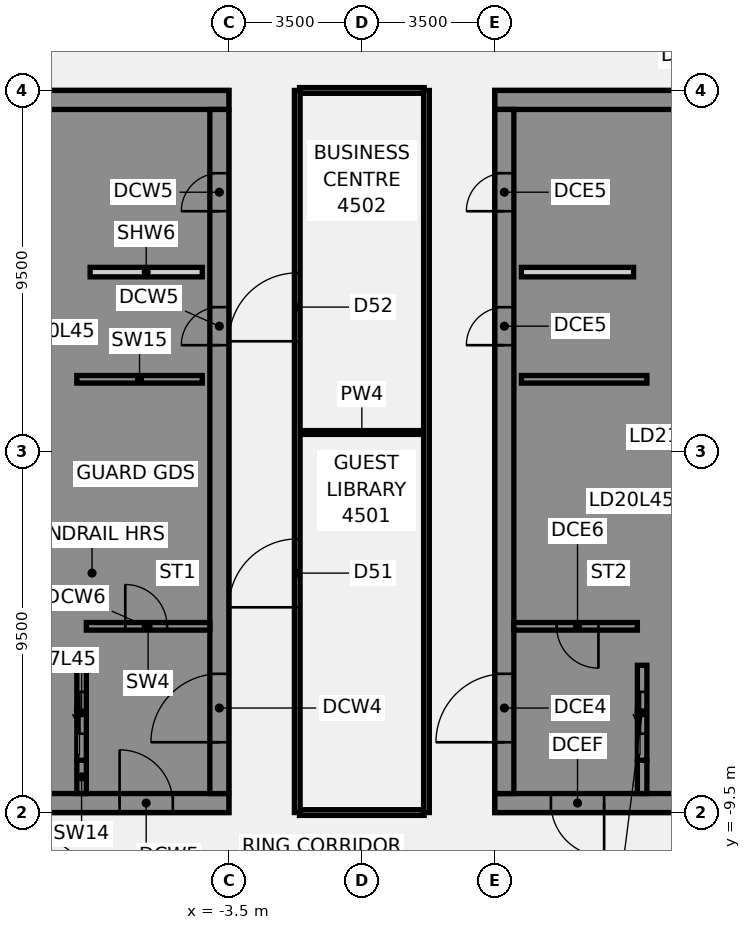
"""IFC4 building model, lengths in metres.
Left out: names, types, materials, properties, quantities, classifications, styles, units other than length and angle.
Written with IfcOpenShell. Run it as: python <this file> out.ifc"""

import sys

from ifc_helpers import new_model, si_unit, direction, frame, frame_2d, origin, place, context, subcontext, project, spatial, polyline, rectangle, outline, extrude, element, fill, save


model = new_model("IFC4")
c1 = context("Model", 3, precision=1e-05, world=origin(), true_north=direction((0.0, 1.0)))
c2 = subcontext(c1, "Body", "Model", "MODEL_VIEW")
j1 = project(units=[si_unit("LENGTHUNIT", "METRE"), si_unit("PLANEANGLEUNIT", "RADIAN")], contexts=[c1])
p1 = place(None, origin())
s1 = spatial("IfcSite", under=j1, at=p1, CompositionType="ELEMENT")
p2 = place(p1, origin())
s2 = spatial("IfcBuilding", under=s1, at=p2, CompositionType="ELEMENT")
p3 = place(p2, frame((0.0, 0.0, 182.5)))
s3 = spatial("IfcBuildingStorey", under=s2, at=p3, CompositionType="ELEMENT", Elevation=182.5)
p4 = place(p3, frame((-1.64, -9.5, 0.0), z_axis=(0.0, 0.0, 1.0), x_axis=(1.0, 0.0, 0.0)))
e1 = element("IfcWall", 1, at=p4, inside=s3, PredefinedType="PARTITIONING", context=c2, shape_type="SweptSolid", body=[
    extrude(rectangle(XDim=3.28, YDim=0.15, at=frame_2d((1.64, 0.0))), origin(), (0.0, 0.0, 1.0), 2.864),
])
p5 = place(p3, frame((-1.64, 0.5, 0.0), z_axis=(0.0, 0.0, 1.0), x_axis=(1.0, 0.0, 0.0)))
e2 = element("IfcWall", 2, at=p5, inside=s3, PredefinedType="PARTITIONING", context=c2, shape_type="SweptSolid", body=[
    extrude(rectangle(XDim=3.28, YDim=0.1, at=frame_2d((1.64, 0.0))), origin(), (0.0, 0.0, 1.0), 2.864),
])
p6 = place(p3, frame((-1.64, 9.5, 0.0), z_axis=(0.0, 0.0, 1.0), x_axis=(1.0, 0.0, 0.0)))
e3 = element("IfcWall", 3, at=p6, inside=s3, PredefinedType="PARTITIONING", context=c2, shape_type="SweptSolid", body=[
    extrude(rectangle(XDim=3.28, YDim=0.15, at=frame_2d((1.64, 0.0))), origin(), (0.0, 0.0, 1.0), 2.864),
])
p7 = place(p3, frame((-1.7, -9.5, 0.0), z_axis=(0.0, 0.0, 1.0), x_axis=(0.0, 1.0, 0.0)))
e4 = element("IfcWall", 4, at=p7, inside=s3, PredefinedType="PARTITIONING", context=c2, shape_type="SweptSolid", body=[
    extrude(rectangle(XDim=19.0, YDim=0.15, at=frame_2d((9.5, 0.0))), origin(), (0.0, 0.0, 1.0), 2.864),
])
p8 = place(p7, frame((5.4, 0.0, 0.0)))
e5 = element("IfcOpeningElement", 5, at=p8, cuts=e4, PredefinedType="OPENING", context=c2, shape_type="SweptSolid", body=[
    extrude(rectangle(XDim=1.8, YDim=2.1, at=frame_2d((0.9, 1.05))), frame((0.0, 0.085, 0.0), z_axis=(0.0, -1.0, 0.0), x_axis=(1.0, 0.0, 0.0)), (0.0, 0.0, 1.0), 0.17),
])
p9 = place(p7, frame((12.4, 0.0, 0.0)))
e6 = element("IfcOpeningElement", 6, at=p9, cuts=e4, PredefinedType="OPENING", context=c2, shape_type="SweptSolid", body=[
    extrude(rectangle(XDim=1.8, YDim=2.1, at=frame_2d((0.9, 1.05))), frame((0.0, 0.085, 0.0), z_axis=(0.0, -1.0, 0.0), x_axis=(1.0, 0.0, 0.0)), (0.0, 0.0, 1.0), 0.17),
])
p10 = place(p3, frame((1.7, -9.5, 0.0), z_axis=(0.0, 0.0, 1.0), x_axis=(0.0, 1.0, 0.0)))
e7 = element("IfcWall", 7, at=p10, inside=s3, PredefinedType="PARTITIONING", context=c2, shape_type="SweptSolid", body=[
    extrude(rectangle(XDim=19.0, YDim=0.15, at=frame_2d((9.5, 0.0))), origin(), (0.0, 0.0, 1.0), 2.864),
])
p11 = place(p3, frame((-16.5, -9.25, 0.0), z_axis=(0.0, 0.0, 1.0), x_axis=(1.0, 0.0, 0.0)))
e8 = element("IfcWall", 8, at=p11, inside=s3, PredefinedType="SHEAR", context=c2, shape_type="SweptSolid", body=[
    extrude(rectangle(XDim=13.0, YDim=0.5, at=frame_2d((6.5, 0.0))), origin(), (0.0, 0.0, 1.0), 3.46),
])
p12 = place(p11, frame((4.15, 0.0, 0.0)))
e9 = element("IfcOpeningElement", 9, at=p12, cuts=e8, PredefinedType="OPENING", context=c2, shape_type="SweptSolid", body=[
    extrude(rectangle(XDim=1.4, YDim=2.1, at=frame_2d((0.7, 1.05))), frame((0.0, 0.26, 0.0), z_axis=(0.0, -1.0, 0.0), x_axis=(1.0, 0.0, 0.0)), (0.0, 0.0, 1.0), 0.52),
])
p13 = place(p11, frame((10.125, 0.0, 0.0)))
e10 = element("IfcOpeningElement", 10, at=p13, cuts=e8, PredefinedType="OPENING", context=c2, shape_type="SweptSolid", body=[
    extrude(rectangle(XDim=1.4, YDim=2.1, at=frame_2d((0.7, 1.05))), frame((0.0, 0.26, 0.0), z_axis=(0.0, -1.0, 0.0), x_axis=(1.0, 0.0, 0.0)), (0.0, 0.0, 1.0), 0.52),
])
p14 = place(p3, frame((-16.5, 9.25, 0.0), z_axis=(0.0, 0.0, 1.0), x_axis=(1.0, 0.0, 0.0)))
e11 = element("IfcWall", 11, at=p14, inside=s3, PredefinedType="SHEAR", context=c2, shape_type="SweptSolid", body=[
    extrude(rectangle(XDim=13.0, YDim=0.5, at=frame_2d((6.5, 0.0))), origin(), (0.0, 0.0, 1.0), 3.46),
])
p15 = place(p3, origin())
e12 = element("IfcWall", 12, at=p15, inside=s3, PredefinedType="SHEAR", context=c2, shape_type="SweptSolid", body=[
    extrude(outline(polyline([(-9.8, -5.375), (-9.8, -5.625), (-7.5, -5.625), (-7.25, -5.625), (-7.25, 9.0), (-7.5, 9.0), (-9.8, 9.0), (-9.8, 8.125), (-7.5, 8.125), (-7.5, 5.625), (-9.8, 5.625), (-9.8, 5.375), (-7.5, 5.375), (-7.5, 2.875), (-9.8, 2.875), (-9.8, 2.625), (-7.5, 2.625), (-7.5, 0.125), (-9.8, 0.125), (-9.8, -0.125), (-7.5, -0.125), (-7.5, -2.625), (-9.8, -2.625), (-9.8, -2.875), (-7.5, -2.875), (-7.5, -5.375), (-9.8, -5.375)])), origin(), (0.0, 0.0, 1.0), 3.46),
])
p16 = place(p3, origin())
e13 = element("IfcWall", 13, at=p16, inside=s3, PredefinedType="SHEAR", context=c2, shape_type="SweptSolid", body=[
    extrude(outline(polyline([(-7.5, -8.125), (-9.55, -8.125), (-9.55, -5.625), (-9.8, -5.625), (-9.8, -8.125), (-9.8, -9.0), (-7.5, -9.0), (-7.5, -8.125)])), origin(), (0.0, 0.0, 1.0), 3.46),
])
p17 = place(p3, frame((-7.375, -9.0, 0.0), z_axis=(0.0, 0.0, 1.0), x_axis=(0.0, 1.0, 0.0)))
e14 = element("IfcWall", 14, at=p17, inside=s3, PredefinedType="SHEAR", context=c2, shape_type="SweptSolid", body=[
    extrude(rectangle(XDim=0.875, YDim=0.25, at=frame_2d((0.438, 0.0))), origin(), (0.0, 0.0, 1.0), 3.46),
])
p18 = place(p3, frame((-7.5, 1.9, 0.0), z_axis=(0.0, 0.0, 1.0), x_axis=(1.0, 0.0, 0.0)))
e15 = element("IfcWall", 15, at=p18, inside=s3, PredefinedType="SHEAR", context=c2, shape_type="SweptSolid", body=[
    extrude(rectangle(XDim=3.3, YDim=0.2, at=frame_2d((1.65, 0.0))), origin(), (0.0, 0.0, 1.0), 3.46),
])
p19 = place(p3, frame((-7.375, -8.125, 0.0), z_axis=(0.0, 0.0, 1.0), x_axis=(0.0, 1.0, 0.0)))
e16 = element("IfcWall", 16, at=p19, inside=s3, PredefinedType="SHEAR", context=c2, shape_type="SweptSolid", body=[
    extrude(rectangle(XDim=2.5, YDim=0.25, at=frame_2d((1.25, 0.0))), origin(), (0.0, 0.0, 1.0), 3.46),
])
p20 = place(p19, frame((0.7, 0.0, 0.0)))
e17 = element("IfcOpeningElement", 17, at=p20, cuts=e16, PredefinedType="OPENING", context=c2, shape_type="SweptSolid", body=[
    extrude(rectangle(XDim=1.1, YDim=2.1, at=frame_2d((0.55, 1.05))), frame((0.0, 0.135, 0.0), z_axis=(0.0, -1.0, 0.0), x_axis=(1.0, 0.0, 0.0)), (0.0, 0.0, 1.0), 0.27),
])
p21 = place(p3, frame((-3.75, -9.0, 0.0), z_axis=(0.0, 0.0, 1.0), x_axis=(0.0, 1.0, 0.0)))
e18 = element("IfcWall", 18, at=p21, inside=s3, PredefinedType="SHEAR", context=c2, shape_type="SweptSolid", body=[
    extrude(rectangle(XDim=18.0, YDim=0.5, at=frame_2d((9.0, 0.0))), origin(), (0.0, 0.0, 1.0), 3.46),
])
p22 = place(p21, frame((1.35, 0.0, 0.0)))
e19 = element("IfcOpeningElement", 19, at=p22, cuts=e18, PredefinedType="OPENING", context=c2, shape_type="SweptSolid", body=[
    extrude(rectangle(XDim=1.8, YDim=2.1, at=frame_2d((0.9, 1.05))), frame((0.0, 0.26, 0.0), z_axis=(0.0, -1.0, 0.0), x_axis=(1.0, 0.0, 0.0)), (0.0, 0.0, 1.0), 0.52),
])
p23 = place(p21, frame((11.798, 0.0, 0.0)))
e20 = element("IfcOpeningElement", 20, at=p23, cuts=e18, PredefinedType="OPENING", context=c2, shape_type="SweptSolid", body=[
    extrude(rectangle(XDim=1.0, YDim=2.1, at=frame_2d((0.5, 1.05))), frame((0.0, 0.26, 0.0), z_axis=(0.0, -1.0, 0.0), x_axis=(1.0, 0.0, 0.0)), (0.0, 0.0, 1.0), 0.52),
])
p24 = place(p21, frame((15.323, 0.0, 0.0)))
e21 = element("IfcOpeningElement", 21, at=p24, cuts=e18, PredefinedType="OPENING", context=c2, shape_type="SweptSolid", body=[
    extrude(rectangle(XDim=1.0, YDim=2.1, at=frame_2d((0.5, 1.05))), frame((0.0, 0.26, 0.0), z_axis=(0.0, -1.0, 0.0), x_axis=(1.0, 0.0, 0.0)), (0.0, 0.0, 1.0), 0.52),
])
p25 = place(p3, frame((-7.15, 4.72, 0.0), z_axis=(0.0, 0.0, 1.0), x_axis=(1.0, 0.0, 0.0)))
e22 = element("IfcWall", 22, at=p25, inside=s3, PredefinedType="PARTITIONING", context=c2, shape_type="SweptSolid", body=[
    extrude(rectangle(XDim=2.95, YDim=0.25, at=frame_2d((1.475, 0.0))), origin(), (0.0, 0.0, 1.0), 3.46),
])
p26 = place(p3, frame((-7.25, -4.6, 0.0), z_axis=(0.0, 0.0, 1.0), x_axis=(1.0, 0.0, 0.0)))
e23 = element("IfcWall", 23, at=p26, inside=s3, PredefinedType="SHEAR", context=c2, shape_type="SweptSolid", body=[
    extrude(rectangle(XDim=3.25, YDim=0.2, at=frame_2d((1.625, 0.0))), origin(), (0.0, 0.0, 1.0), 3.46),
])
p27 = place(p26, frame((1.025, 0.0, 0.0)))
e24 = element("IfcOpeningElement", 24, at=p27, cuts=e23, PredefinedType="OPENING", context=c2, shape_type="SweptSolid", body=[
    extrude(rectangle(XDim=1.1, YDim=2.1, at=frame_2d((0.55, 1.05))), frame((0.0, 0.11, 0.0), z_axis=(0.0, -1.0, 0.0), x_axis=(1.0, 0.0, 0.0)), (0.0, 0.0, 1.0), 0.22),
])
p28 = place(p3, frame((16.5, -9.25, 0.0), z_axis=(0.0, 0.0, 1.0), x_axis=(-1.0, 0.0, 0.0)))
e25 = element("IfcWall", 25, at=p28, inside=s3, PredefinedType="SHEAR", context=c2, shape_type="SweptSolid", body=[
    extrude(rectangle(XDim=13.0, YDim=0.5, at=frame_2d((6.5, 0.0))), origin(), (0.0, 0.0, 1.0), 3.46),
])
p29 = place(p28, frame((4.15, 0.0, 0.0)))
e26 = element("IfcOpeningElement", 26, at=p29, cuts=e25, PredefinedType="OPENING", context=c2, shape_type="SweptSolid", body=[
    extrude(rectangle(XDim=1.4, YDim=2.1, at=frame_2d((0.7, 1.05))), frame((0.0, 0.26, 0.0), z_axis=(0.0, -1.0, 0.0), x_axis=(1.0, 0.0, 0.0)), (0.0, 0.0, 1.0), 0.52),
])
p30 = place(p28, frame((10.125, 0.0, 0.0)))
e27 = element("IfcOpeningElement", 27, at=p30, cuts=e25, PredefinedType="OPENING", context=c2, shape_type="SweptSolid", body=[
    extrude(rectangle(XDim=1.4, YDim=2.1, at=frame_2d((0.7, 1.05))), frame((0.0, 0.26, 0.0), z_axis=(0.0, -1.0, 0.0), x_axis=(1.0, 0.0, 0.0)), (0.0, 0.0, 1.0), 0.52),
])
p31 = place(p3, frame((16.5, 9.25, 0.0), z_axis=(0.0, 0.0, 1.0), x_axis=(-1.0, 0.0, 0.0)))
e28 = element("IfcWall", 28, at=p31, inside=s3, PredefinedType="SHEAR", context=c2, shape_type="SweptSolid", body=[
    extrude(rectangle(XDim=13.0, YDim=0.5, at=frame_2d((6.5, 0.0))), origin(), (0.0, 0.0, 1.0), 3.46),
])
p32 = place(p3, origin())
e29 = element("IfcWall", 29, at=p32, inside=s3, PredefinedType="SHEAR", context=c2, shape_type="SweptSolid", body=[
    extrude(outline(polyline([(9.8, -5.375), (7.5, -5.375), (7.5, -2.875), (9.8, -2.875), (9.8, -2.625), (7.5, -2.625), (7.5, -0.125), (9.8, -0.125), (9.8, 0.125), (7.5, 0.125), (7.5, 2.625), (9.8, 2.625), (9.8, 2.875), (7.5, 2.875), (7.5, 5.375), (9.8, 5.375), (9.8, 5.625), (7.5, 5.625), (7.5, 8.125), (9.8, 8.125), (9.8, 9.0), (7.5, 9.0), (7.25, 9.0), (7.25, -5.625), (7.5, -5.625), (9.8, -5.625), (9.8, -5.375)])), origin(), (0.0, 0.0, 1.0), 3.46),
])
p33 = place(p3, origin())
e30 = element("IfcWall", 30, at=p33, inside=s3, PredefinedType="SHEAR", context=c2, shape_type="SweptSolid", body=[
    extrude(outline(polyline([(7.5, -8.125), (7.5, -9.0), (9.8, -9.0), (9.8, -8.125), (9.8, -5.625), (9.55, -5.625), (9.55, -8.125), (7.5, -8.125)])), origin(), (0.0, 0.0, 1.0), 3.46),
])
p34 = place(p3, frame((7.375, -9.0, 0.0), z_axis=(0.0, 0.0, 1.0), x_axis=(0.0, 1.0, 0.0)))
e31 = element("IfcWall", 31, at=p34, inside=s3, PredefinedType="SHEAR", context=c2, shape_type="SweptSolid", body=[
    extrude(rectangle(XDim=0.875, YDim=0.25, at=frame_2d((0.438, 0.0))), origin(), (0.0, 0.0, 1.0), 3.46),
])
p35 = place(p3, frame((7.5, 1.9, 0.0), z_axis=(0.0, 0.0, 1.0), x_axis=(-1.0, 0.0, 0.0)))
e32 = element("IfcWall", 32, at=p35, inside=s3, PredefinedType="SHEAR", context=c2, shape_type="SweptSolid", body=[
    extrude(rectangle(XDim=3.3, YDim=0.2, at=frame_2d((1.65, 0.0))), origin(), (0.0, 0.0, 1.0), 3.46),
])
p36 = place(p3, frame((7.375, -8.125, 0.0), z_axis=(0.0, 0.0, 1.0), x_axis=(0.0, 1.0, 0.0)))
e33 = element("IfcWall", 33, at=p36, inside=s3, PredefinedType="SHEAR", context=c2, shape_type="SweptSolid", body=[
    extrude(rectangle(XDim=2.5, YDim=0.25, at=frame_2d((1.25, 0.0))), origin(), (0.0, 0.0, 1.0), 3.46),
])
p37 = place(p36, frame((0.7, 0.0, 0.0)))
e34 = element("IfcOpeningElement", 34, at=p37, cuts=e33, PredefinedType="OPENING", context=c2, shape_type="SweptSolid", body=[
    extrude(rectangle(XDim=1.1, YDim=2.1, at=frame_2d((0.55, 1.05))), frame((0.0, 0.135, 0.0), z_axis=(0.0, -1.0, 0.0), x_axis=(1.0, 0.0, 0.0)), (0.0, 0.0, 1.0), 0.27),
])
p38 = place(p3, frame((3.75, -9.0, 0.0), z_axis=(0.0, 0.0, 1.0), x_axis=(0.0, 1.0, 0.0)))
e35 = element("IfcWall", 35, at=p38, inside=s3, PredefinedType="SHEAR", context=c2, shape_type="SweptSolid", body=[
    extrude(rectangle(XDim=18.0, YDim=0.5, at=frame_2d((9.0, 0.0))), origin(), (0.0, 0.0, 1.0), 3.46),
])
p39 = place(p38, frame((1.35, 0.0, 0.0)))
e36 = element("IfcOpeningElement", 36, at=p39, cuts=e35, PredefinedType="OPENING", context=c2, shape_type="SweptSolid", body=[
    extrude(rectangle(XDim=1.8, YDim=2.1, at=frame_2d((0.9, 1.05))), frame((0.0, 0.26, 0.0), z_axis=(0.0, -1.0, 0.0), x_axis=(1.0, 0.0, 0.0)), (0.0, 0.0, 1.0), 0.52),
])
p40 = place(p38, frame((11.798, 0.0, 0.0)))
e37 = element("IfcOpeningElement", 37, at=p40, cuts=e35, PredefinedType="OPENING", context=c2, shape_type="SweptSolid", body=[
    extrude(rectangle(XDim=1.0, YDim=2.1, at=frame_2d((0.5, 1.05))), frame((0.0, 0.26, 0.0), z_axis=(0.0, -1.0, 0.0), x_axis=(1.0, 0.0, 0.0)), (0.0, 0.0, 1.0), 0.52),
])
p41 = place(p38, frame((15.323, 0.0, 0.0)))
e38 = element("IfcOpeningElement", 38, at=p41, cuts=e35, PredefinedType="OPENING", context=c2, shape_type="SweptSolid", body=[
    extrude(rectangle(XDim=1.0, YDim=2.1, at=frame_2d((0.5, 1.05))), frame((0.0, 0.26, 0.0), z_axis=(0.0, -1.0, 0.0), x_axis=(1.0, 0.0, 0.0)), (0.0, 0.0, 1.0), 0.52),
])
p42 = place(p3, frame((7.15, 4.72, 0.0), z_axis=(0.0, 0.0, 1.0), x_axis=(-1.0, 0.0, 0.0)))
e39 = element("IfcWall", 39, at=p42, inside=s3, PredefinedType="PARTITIONING", context=c2, shape_type="SweptSolid", body=[
    extrude(rectangle(XDim=2.95, YDim=0.25, at=frame_2d((1.475, 0.0))), origin(), (0.0, 0.0, 1.0), 3.46),
])
p43 = place(p3, frame((7.25, -4.6, 0.0), z_axis=(0.0, 0.0, 1.0), x_axis=(-1.0, 0.0, 0.0)))
e40 = element("IfcWall", 40, at=p43, inside=s3, PredefinedType="SHEAR", context=c2, shape_type="SweptSolid", body=[
    extrude(rectangle(XDim=3.25, YDim=0.2, at=frame_2d((1.625, 0.0))), origin(), (0.0, 0.0, 1.0), 3.46),
])
p44 = place(p43, frame((1.025, 0.0, 0.0)))
e41 = element("IfcOpeningElement", 41, at=p44, cuts=e40, PredefinedType="OPENING", context=c2, shape_type="SweptSolid", body=[
    extrude(rectangle(XDim=1.1, YDim=2.1, at=frame_2d((0.55, 1.05))), frame((0.0, 0.11, 0.0), z_axis=(0.0, -1.0, 0.0), x_axis=(1.0, 0.0, 0.0)), (0.0, 0.0, 1.0), 0.22),
])
p45 = place(p8, frame((1.8, 0.0, 0.0), z_axis=(0.0, 0.0, 1.0), x_axis=(-1.0, 0.0, 0.0)))
e42 = element("IfcDoor", 42, at=p45, inside=s3, OperationType="DOUBLE_DOOR_SINGLE_SWING", PredefinedType="DOOR", context=c2, shape_type="SweptSolid", body=[
    extrude(rectangle(XDim=1.8, YDim=2.1, at=frame_2d((0.9, 1.05))), frame((0.0, 0.025, 0.0), z_axis=(0.0, -1.0, 0.0), x_axis=(1.0, 0.0, 0.0)), (0.0, 0.0, 1.0), 0.05),
])
fill(e5, e42)
p46 = place(p9, frame((1.8, 0.0, 0.0), z_axis=(0.0, 0.0, 1.0), x_axis=(-1.0, 0.0, 0.0)))
e43 = element("IfcDoor", 43, at=p46, inside=s3, OperationType="DOUBLE_DOOR_SINGLE_SWING", PredefinedType="DOOR", context=c2, shape_type="SweptSolid", body=[
    extrude(rectangle(XDim=1.8, YDim=2.1, at=frame_2d((0.9, 1.05))), frame((0.0, 0.025, 0.0), z_axis=(0.0, -1.0, 0.0), x_axis=(1.0, 0.0, 0.0)), (0.0, 0.0, 1.0), 0.05),
])
fill(e6, e43)
p47 = place(p13, origin())
e44 = element("IfcDoor", 44, at=p47, inside=s3, OperationType="SINGLE_SWING_LEFT", PredefinedType="DOOR", context=c2, shape_type="SweptSolid", body=[
    extrude(rectangle(XDim=1.4, YDim=2.1, at=frame_2d((0.7, 1.05))), frame((0.0, 0.025, 0.0), z_axis=(0.0, -1.0, 0.0), x_axis=(1.0, 0.0, 0.0)), (0.0, 0.0, 1.0), 0.05),
])
fill(e10, e44)
p48 = place(p22, origin())
e45 = element("IfcDoor", 45, at=p48, inside=s3, OperationType="SINGLE_SWING_LEFT", PredefinedType="DOOR", context=c2, shape_type="SweptSolid", body=[
    extrude(rectangle(XDim=1.8, YDim=2.1, at=frame_2d((0.9, 1.05))), frame((0.0, 0.025, 0.0), z_axis=(0.0, -1.0, 0.0), x_axis=(1.0, 0.0, 0.0)), (0.0, 0.0, 1.0), 0.05),
])
fill(e19, e45)
p49 = place(p23, origin())
e46 = element("IfcDoor", 46, at=p49, inside=s3, OperationType="SINGLE_SWING_LEFT", PredefinedType="DOOR", context=c2, shape_type="SweptSolid", body=[
    extrude(rectangle(XDim=1.0, YDim=2.1, at=frame_2d((0.5, 1.05))), frame((0.0, 0.225, 0.0), z_axis=(0.0, -1.0, 0.0), x_axis=(1.0, 0.0, 0.0)), (0.0, 0.0, 1.0), 0.05),
])
fill(e20, e46)
p50 = place(p24, origin())
e47 = element("IfcDoor", 47, at=p50, inside=s3, OperationType="SINGLE_SWING_LEFT", PredefinedType="DOOR", context=c2, shape_type="SweptSolid", body=[
    extrude(rectangle(XDim=1.0, YDim=2.1, at=frame_2d((0.5, 1.05))), frame((0.0, 0.225, 0.0), z_axis=(0.0, -1.0, 0.0), x_axis=(1.0, 0.0, 0.0)), (0.0, 0.0, 1.0), 0.05),
])
fill(e21, e47)
p51 = place(p27, origin())
e48 = element("IfcDoor", 48, at=p51, inside=s3, OperationType="SINGLE_SWING_LEFT", PredefinedType="DOOR", context=c2, shape_type="SweptSolid", body=[
    extrude(rectangle(XDim=1.1, YDim=2.1, at=frame_2d((0.55, 1.05))), frame((0.0, 0.025, 0.0), z_axis=(0.0, -1.0, 0.0), x_axis=(1.0, 0.0, 0.0)), (0.0, 0.0, 1.0), 0.05),
])
fill(e24, e48)
p52 = place(p20, origin())
e49 = element("IfcDoor", 49, at=p52, inside=s3, OperationType="SLIDING_TO_LEFT", PredefinedType="DOOR", context=c2, shape_type="SweptSolid", body=[
    extrude(rectangle(XDim=1.1, YDim=2.1, at=frame_2d((0.55, 1.05))), frame((0.0, 0.025, 0.0), z_axis=(0.0, -1.0, 0.0), x_axis=(1.0, 0.0, 0.0)), (0.0, 0.0, 1.0), 0.05),
])
fill(e17, e49)
p53 = place(p30, origin())
e50 = element("IfcDoor", 50, at=p53, inside=s3, OperationType="SINGLE_SWING_LEFT", PredefinedType="DOOR", context=c2, shape_type="SweptSolid", body=[
    extrude(rectangle(XDim=1.4, YDim=2.1, at=frame_2d((0.7, 1.05))), frame((0.0, 0.025, 0.0), z_axis=(0.0, -1.0, 0.0), x_axis=(1.0, 0.0, 0.0)), (0.0, 0.0, 1.0), 0.05),
])
fill(e27, e50)
p54 = place(p39, origin())
e51 = element("IfcDoor", 51, at=p54, inside=s3, OperationType="SINGLE_SWING_LEFT", PredefinedType="DOOR", context=c2, shape_type="SweptSolid", body=[
    extrude(rectangle(XDim=1.8, YDim=2.1, at=frame_2d((0.9, 1.05))), frame((0.0, 0.025, 0.0), z_axis=(0.0, -1.0, 0.0), x_axis=(1.0, 0.0, 0.0)), (0.0, 0.0, 1.0), 0.05),
])
fill(e36, e51)
p55 = place(p40, origin())
e52 = element("IfcDoor", 52, at=p55, inside=s3, OperationType="SINGLE_SWING_LEFT", PredefinedType="DOOR", context=c2, shape_type="SweptSolid", body=[
    extrude(rectangle(XDim=1.0, YDim=2.1, at=frame_2d((0.5, 1.05))), frame((0.0, -0.175, 0.0), z_axis=(0.0, -1.0, 0.0), x_axis=(1.0, 0.0, 0.0)), (0.0, 0.0, 1.0), 0.05),
])
fill(e37, e52)
p56 = place(p41, origin())
e53 = element("IfcDoor", 53, at=p56, inside=s3, OperationType="SINGLE_SWING_LEFT", PredefinedType="DOOR", context=c2, shape_type="SweptSolid", body=[
    extrude(rectangle(XDim=1.0, YDim=2.1, at=frame_2d((0.5, 1.05))), frame((0.0, -0.175, 0.0), z_axis=(0.0, -1.0, 0.0), x_axis=(1.0, 0.0, 0.0)), (0.0, 0.0, 1.0), 0.05),
])
fill(e38, e53)
p57 = place(p44, origin())
e54 = element("IfcDoor", 54, at=p57, inside=s3, OperationType="SINGLE_SWING_LEFT", PredefinedType="DOOR", context=c2, shape_type="SweptSolid", body=[
    extrude(rectangle(XDim=1.1, YDim=2.1, at=frame_2d((0.55, 1.05))), frame((0.0, 0.025, 0.0), z_axis=(0.0, -1.0, 0.0), x_axis=(1.0, 0.0, 0.0)), (0.0, 0.0, 1.0), 0.05),
])
fill(e41, e54)
p58 = place(p37, origin())
e55 = element("IfcDoor", 55, at=p58, inside=s3, OperationType="SLIDING_TO_LEFT", PredefinedType="DOOR", context=c2, shape_type="SweptSolid", body=[
    extrude(rectangle(XDim=1.1, YDim=2.1, at=frame_2d((0.55, 1.05))), frame((0.0, 0.025, 0.0), z_axis=(0.0, -1.0, 0.0), x_axis=(1.0, 0.0, 0.0)), (0.0, 0.0, 1.0), 0.05),
])
fill(e34, e55)
save(model, sys.argv[1])
